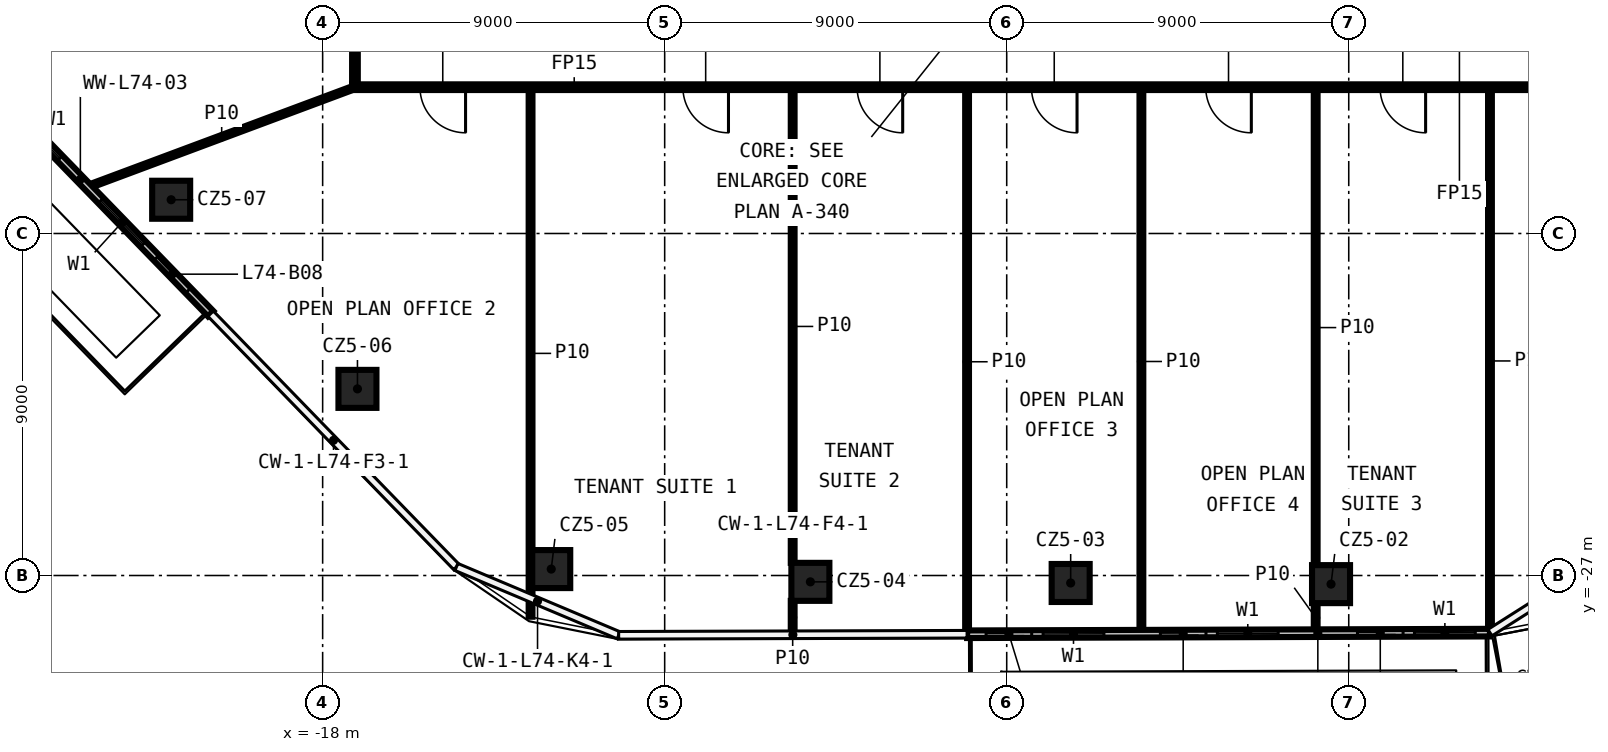
"""IFC4 building model, lengths in metres.
Left out: names, types, materials, properties, quantities, classifications, styles, units other than length and angle.
Written with IfcOpenShell. Run it as: python <this file> out.ifc"""

import sys

from ifc_helpers import new_model, si_unit, direction, frame, frame_2d, origin, origin_2d, place, context, subcontext, project, spatial, rectangle, extrude, element, fill, save


model = new_model("IFC4")
c1 = context("Model", 3, precision=1e-05, world=origin(), true_north=direction((0.0, 1.0)))
c2 = subcontext(c1, "Body", "Model", "MODEL_VIEW")
j1 = project(units=[si_unit("LENGTHUNIT", "METRE"), si_unit("PLANEANGLEUNIT", "RADIAN")], contexts=[c1])
p1 = place(None, origin())
s1 = spatial("IfcSite", under=j1, at=p1, CompositionType="ELEMENT")
p2 = place(p1, origin())
s2 = spatial("IfcBuilding", under=s1, at=p2, CompositionType="ELEMENT")
p3 = place(p2, frame((0.0, 0.0, 344.6)))
s3 = spatial("IfcBuildingStorey", under=s2, at=p3, CompositionType="ELEMENT", Elevation=344.6)
for number, where, z_axis, x_axis in (
    (1, (8.534, -27.227, 0.0), (0.0, 0.0, 1.0), (1.0, 0.0, 0.0)),
    (2, (1.683, -27.197, 0.0), (0.0, 0.0, 1.0), (1.0, 0.0, 0.0)),
    (3, (-5.166, -27.167, 0.0), (0.0, 0.0, 1.0), (1.0, 0.0, 0.0)),
    (4, (-11.985, -26.831, 0.0), (0.0, 0.0, 1.0), (1.0, 0.0, 0.0)),
    (5, (-17.084, -22.089, 0.0), (0.0, 0.0, 1.0), (1.0, 0.0, 0.0)),
    (6, (-21.986, -17.112, 0.0), (0.0, 0.0, 1.0), (1.0, 0.0, 0.0)),
):
    element("IfcColumn", number, at=place(p3, frame(where, z_axis=z_axis, x_axis=x_axis)), inside=s3, PredefinedType="COLUMN", context=c2, shape_type="SweptSolid", body=[
        extrude(rectangle(XDim=1.0, YDim=1.0, at=origin_2d()), origin(), (0.0, 0.0, 1.0), 3.82),
    ])
p4 = place(p3, frame((17.225, -14.15, 0.0), z_axis=(0.0, 0.0, 1.0), x_axis=(-1.0, 0.0, 0.0)))
e7 = element("IfcWall", 7, at=p4, inside=s3, PredefinedType="PARTITIONING", context=c2, shape_type="SweptSolid", body=[
    extrude(rectangle(XDim=34.45, YDim=0.15, at=frame_2d((17.225, 0.0))), origin(), (0.0, 0.0, 1.0), 3.82),
])
p5 = place(p4, frame((31.464, 0.0, 0.0)))
e8 = element("IfcOpeningElement", 8, at=p5, cuts=e7, PredefinedType="OPENING", context=c2, shape_type="SweptSolid", body=[
    extrude(rectangle(XDim=1.2, YDim=2.1, at=frame_2d((0.6, 1.05))), frame((0.0, 0.085, 0.0), z_axis=(0.0, -1.0, 0.0), x_axis=(1.0, 0.0, 0.0)), (0.0, 0.0, 1.0), 0.17),
])
p6 = place(p4, frame((24.546, 0.0, 0.0)))
e9 = element("IfcOpeningElement", 9, at=p6, cuts=e7, PredefinedType="OPENING", context=c2, shape_type="SweptSolid", body=[
    extrude(rectangle(XDim=1.2, YDim=2.1, at=frame_2d((0.6, 1.05))), frame((0.0, 0.085, 0.0), z_axis=(0.0, -1.0, 0.0), x_axis=(1.0, 0.0, 0.0)), (0.0, 0.0, 1.0), 0.17),
])
p7 = place(p4, frame((19.962, 0.0, 0.0)))
e10 = element("IfcOpeningElement", 10, at=p7, cuts=e7, PredefinedType="OPENING", context=c2, shape_type="SweptSolid", body=[
    extrude(rectangle(XDim=1.2, YDim=2.1, at=frame_2d((0.6, 1.05))), frame((0.0, 0.085, 0.0), z_axis=(0.0, -1.0, 0.0), x_axis=(1.0, 0.0, 0.0)), (0.0, 0.0, 1.0), 0.17),
])
p8 = place(p4, frame((15.375, 0.0, 0.0)))
e11 = element("IfcOpeningElement", 11, at=p8, cuts=e7, PredefinedType="OPENING", context=c2, shape_type="SweptSolid", body=[
    extrude(rectangle(XDim=1.2, YDim=2.1, at=frame_2d((0.6, 1.05))), frame((0.0, 0.085, 0.0), z_axis=(0.0, -1.0, 0.0), x_axis=(1.0, 0.0, 0.0)), (0.0, 0.0, 1.0), 0.17),
])
p9 = place(p4, frame((10.788, 0.0, 0.0)))
e12 = element("IfcOpeningElement", 12, at=p9, cuts=e7, PredefinedType="OPENING", context=c2, shape_type="SweptSolid", body=[
    extrude(rectangle(XDim=1.2, YDim=2.1, at=frame_2d((0.6, 1.05))), frame((0.0, 0.085, 0.0), z_axis=(0.0, -1.0, 0.0), x_axis=(1.0, 0.0, 0.0)), (0.0, 0.0, 1.0), 0.17),
])
p10 = place(p4, frame((6.202, 0.0, 0.0)))
e13 = element("IfcOpeningElement", 13, at=p10, cuts=e7, PredefinedType="OPENING", context=c2, shape_type="SweptSolid", body=[
    extrude(rectangle(XDim=1.2, YDim=2.1, at=frame_2d((0.6, 1.05))), frame((0.0, 0.085, 0.0), z_axis=(0.0, -1.0, 0.0), x_axis=(1.0, 0.0, 0.0)), (0.0, 0.0, 1.0), 0.17),
])
p11 = place(p4, frame((1.897, 0.0, 0.0)))
e14 = element("IfcOpeningElement", 14, at=p11, cuts=e7, PredefinedType="OPENING", context=c2, shape_type="SweptSolid", body=[
    extrude(rectangle(XDim=1.2, YDim=2.1, at=frame_2d((0.6, 1.05))), frame((0.0, 0.085, 0.0), z_axis=(0.0, -1.0, 0.0), x_axis=(1.0, 0.0, 0.0)), (0.0, 0.0, 1.0), 0.17),
])
p12 = place(p3, frame((-24.164, -16.767, 0.0), z_axis=(0.0, 0.0, 1.0), x_axis=(0.936910882714, 0.349568302127, 0.0)))
e15 = element("IfcWall", 15, at=p12, inside=s3, PredefinedType="PARTITIONING", context=c2, shape_type="SweptSolid", body=[
    extrude(rectangle(XDim=7.486, YDim=0.1, at=frame_2d((3.743, 0.0))), origin(), (0.0, 0.0, 1.0), 3.82),
])
p13 = place(p3, frame((12.716, -28.483, 0.0), z_axis=(0.0, 0.0, 1.0), x_axis=(0.0, 1.0, 0.0)))
e16 = element("IfcWall", 16, at=p13, inside=s3, PredefinedType="PARTITIONING", context=c2, shape_type="SweptSolid", body=[
    extrude(rectangle(XDim=14.258, YDim=0.1, at=frame_2d((7.129, 0.0))), origin(), (0.0, 0.0, 1.0), 3.82),
])
p14 = place(p3, frame((8.13, -28.498, 0.0), z_axis=(0.0, 0.0, 1.0), x_axis=(0.0, 1.0, 0.0)))
e17 = element("IfcWall", 17, at=p14, inside=s3, PredefinedType="PARTITIONING", context=c2, shape_type="SweptSolid", body=[
    extrude(rectangle(XDim=0.771, YDim=0.1, at=frame_2d((0.385, 0.0))), origin(), (0.0, 0.0, 1.0), 3.82),
])
p15 = place(p3, frame((8.13, -26.727, 0.0), z_axis=(0.0, 0.0, 1.0), x_axis=(0.0, 1.0, 0.0)))
e18 = element("IfcWall", 18, at=p15, inside=s3, PredefinedType="PARTITIONING", context=c2, shape_type="SweptSolid", body=[
    extrude(rectangle(XDim=12.502, YDim=0.1, at=frame_2d((6.251, 0.0))), origin(), (0.0, 0.0, 1.0), 3.82),
])
p16 = place(p3, frame((3.544, -28.512, 0.0), z_axis=(0.0, 0.0, 1.0), x_axis=(0.0, 1.0, 0.0)))
e19 = element("IfcWall", 19, at=p16, inside=s3, PredefinedType="PARTITIONING", context=c2, shape_type="SweptSolid", body=[
    extrude(rectangle(XDim=14.287, YDim=0.1, at=frame_2d((7.143, 0.0))), origin(), (0.0, 0.0, 1.0), 3.82),
])
p17 = place(p3, frame((-1.043, -28.526, 0.0), z_axis=(0.0, 0.0, 1.0), x_axis=(0.0, 1.0, 0.0)))
e20 = element("IfcWall", 20, at=p17, inside=s3, PredefinedType="PARTITIONING", context=c2, shape_type="SweptSolid", body=[
    extrude(rectangle(XDim=14.301, YDim=0.1, at=frame_2d((7.15, 0.0))), origin(), (0.0, 0.0, 1.0), 3.82),
])
p18 = place(p3, frame((-5.632, -28.54, 0.0), z_axis=(0.0, 0.0, 1.0), x_axis=(0.0, 1.0, 0.0)))
e21 = element("IfcWall", 21, at=p18, inside=s3, PredefinedType="PARTITIONING", context=c2, shape_type="SweptSolid", body=[
    extrude(rectangle(XDim=0.873, YDim=0.1, at=frame_2d((0.437, 0.0))), origin(), (0.0, 0.0, 1.0), 3.82),
])
p19 = place(p3, frame((-5.632, -26.667, 0.0), z_axis=(0.0, 0.0, 1.0), x_axis=(0.0, 1.0, 0.0)))
e22 = element("IfcWall", 22, at=p19, inside=s3, PredefinedType="PARTITIONING", context=c2, shape_type="SweptSolid", body=[
    extrude(rectangle(XDim=12.442, YDim=0.1, at=frame_2d((6.221, 0.0))), origin(), (0.0, 0.0, 1.0), 3.82),
])
p20 = place(p3, frame((-12.529, -28.085, 0.0), z_axis=(0.0, 0.0, 1.0), x_axis=(0.0, 1.0, 0.0)))
e23 = element("IfcWall", 23, at=p20, inside=s3, PredefinedType="PARTITIONING", context=c2, shape_type="SweptSolid", body=[
    extrude(rectangle(XDim=13.86, YDim=0.1, at=frame_2d((6.93, 0.0))), origin(), (0.0, 0.0, 1.0), 3.82),
])
p21 = place(p3, frame((-17.15, -14.075, 0.0), z_axis=(0.0, 0.0, 1.0), x_axis=(0.0, 1.0, 0.0)))
e24 = element("IfcWall", 24, at=p21, inside=s3, PredefinedType="PARTITIONING", context=c2, shape_type="SweptSolid", body=[
    extrude(rectangle(XDim=28.15, YDim=0.15, at=frame_2d((14.075, 0.0))), origin(), (0.0, 0.0, 1.0), 3.82),
])
p22 = place(p21, frame((3.891, 0.0, 0.0)))
e25 = element("IfcOpeningElement", 25, at=p22, cuts=e24, PredefinedType="OPENING", context=c2, shape_type="SweptSolid", body=[
    extrude(rectangle(XDim=1.2, YDim=2.1, at=frame_2d((0.6, 1.05))), frame((0.0, 0.085, 0.0), z_axis=(0.0, -1.0, 0.0), x_axis=(1.0, 0.0, 0.0)), (0.0, 0.0, 1.0), 0.17),
])
p23 = place(p21, frame((24.312, 0.0, 0.0)))
e26 = element("IfcOpeningElement", 26, at=p23, cuts=e24, PredefinedType="OPENING", context=c2, shape_type="SweptSolid", body=[
    extrude(rectangle(XDim=1.2, YDim=2.1, at=frame_2d((0.6, 1.05))), frame((0.0, 0.085, 0.0), z_axis=(0.0, -1.0, 0.0), x_axis=(1.0, 0.0, 0.0)), (0.0, 0.0, 1.0), 0.17),
])
p24 = place(p3, frame((-27.422, -13.438, 0.0), z_axis=(0.0, 0.0, 1.0), x_axis=(0.696377931732, -0.717675258175, 0.0)))
e27 = element("IfcWall", 27, at=p24, inside=s3, PredefinedType="SOLIDWALL", context=c2, shape_type="SweptSolid", body=[
    extrude(rectangle(XDim=9.297, YDim=0.2, at=frame_2d((4.648, 0.0))), origin(), (0.0, 0.0, 1.0), 3.7),
])
p25 = place(p24, frame((2.0, 0.0, 0.6)))
e28 = element("IfcOpeningElement", 28, at=p25, cuts=e27, PredefinedType="OPENING", context=c2, shape_type="SweptSolid", body=[
    extrude(rectangle(XDim=1.6, YDim=2.4, at=frame_2d((0.8, 1.2))), frame((0.0, 0.11, 0.0), z_axis=(0.0, -1.0, 0.0), x_axis=(1.0, 0.0, 0.0)), (0.0, 0.0, 1.0), 0.22),
])
p26 = place(p24, frame((0.5, 0.0, 0.0)))
e29 = element("IfcOpeningElement", 29, at=p26, cuts=e27, PredefinedType="OPENING", context=c2, shape_type="SweptSolid", body=[
    extrude(rectangle(XDim=1.2, YDim=2.4, at=frame_2d((0.6, 1.2))), frame((0.0, 0.11, 0.0), z_axis=(0.0, -1.0, 0.0), x_axis=(1.0, 0.0, 0.0)), (0.0, 0.0, 1.0), 0.22),
])
p27 = place(p24, frame((5.148, 0.0, 0.6)))
e30 = element("IfcOpeningElement", 30, at=p27, cuts=e27, PredefinedType="OPENING", context=c2, shape_type="SweptSolid", body=[
    extrude(rectangle(XDim=1.6, YDim=2.4, at=frame_2d((0.8, 1.2))), frame((0.0, 0.11, 0.0), z_axis=(0.0, -1.0, 0.0), x_axis=(1.0, 0.0, 0.0)), (0.0, 0.0, 1.0), 0.22),
])
p28 = place(p24, frame((7.249, 0.0, 0.0)))
e31 = element("IfcOpeningElement", 31, at=p28, cuts=e27, PredefinedType="OPENING", context=c2, shape_type="SweptSolid", body=[
    extrude(rectangle(XDim=1.2, YDim=2.4, at=frame_2d((0.6, 1.2))), frame((0.0, 0.11, 0.0), z_axis=(0.0, -1.0, 0.0), x_axis=(1.0, 0.0, 0.0)), (0.0, 0.0, 1.0), 0.22),
])
p29 = place(p3, frame((-1.042, -28.546, 0.0), z_axis=(0.0, 0.0, 1.0), x_axis=(0.999995287953, 0.003069865224, 0.0)))
e32 = element("IfcWall", 32, at=p29, inside=s3, PredefinedType="SOLIDWALL", context=c2, shape_type="SweptSolid", body=[
    extrude(rectangle(XDim=13.758, YDim=0.2, at=frame_2d((6.879, 0.0))), origin(), (0.0, 0.0, 1.0), 3.7),
])
p30 = place(p29, frame((2.0, 0.0, 0.6)))
e33 = element("IfcOpeningElement", 33, at=p30, cuts=e32, PredefinedType="OPENING", context=c2, shape_type="SweptSolid", body=[
    extrude(rectangle(XDim=1.6, YDim=2.4, at=frame_2d((0.8, 1.2))), frame((0.0, 0.11, 0.0), z_axis=(0.0, -1.0, 0.0), x_axis=(1.0, 0.0, 0.0)), (0.0, 0.0, 1.0), 0.22),
])
p31 = place(p29, frame((0.5, 0.0, 0.0)))
e34 = element("IfcOpeningElement", 34, at=p31, cuts=e32, PredefinedType="OPENING", context=c2, shape_type="SweptSolid", body=[
    extrude(rectangle(XDim=1.2, YDim=2.4, at=frame_2d((0.6, 1.2))), frame((0.0, 0.11, 0.0), z_axis=(0.0, -1.0, 0.0), x_axis=(1.0, 0.0, 0.0)), (0.0, 0.0, 1.0), 0.22),
])
p32 = place(p29, frame((6.586, 0.0, 0.6)))
e35 = element("IfcOpeningElement", 35, at=p32, cuts=e32, PredefinedType="OPENING", context=c2, shape_type="SweptSolid", body=[
    extrude(rectangle(XDim=1.6, YDim=2.4, at=frame_2d((0.8, 1.2))), frame((0.0, 0.11, 0.0), z_axis=(0.0, -1.0, 0.0), x_axis=(1.0, 0.0, 0.0)), (0.0, 0.0, 1.0), 0.22),
])
p33 = place(p29, frame((5.086, 0.0, 0.0)))
e36 = element("IfcOpeningElement", 36, at=p33, cuts=e32, PredefinedType="OPENING", context=c2, shape_type="SweptSolid", body=[
    extrude(rectangle(XDim=1.2, YDim=2.4, at=frame_2d((0.6, 1.2))), frame((0.0, 0.11, 0.0), z_axis=(0.0, -1.0, 0.0), x_axis=(1.0, 0.0, 0.0)), (0.0, 0.0, 1.0), 0.22),
])
p34 = place(p29, frame((11.772, 0.0, 0.6)))
e37 = element("IfcOpeningElement", 37, at=p34, cuts=e32, PredefinedType="OPENING", context=c2, shape_type="SweptSolid", body=[
    extrude(rectangle(XDim=1.6, YDim=2.4, at=frame_2d((0.8, 1.2))), frame((0.0, 0.11, 0.0), z_axis=(0.0, -1.0, 0.0), x_axis=(1.0, 0.0, 0.0)), (0.0, 0.0, 1.0), 0.22),
])
p35 = place(p29, frame((10.272, 0.0, 0.0)))
e38 = element("IfcOpeningElement", 38, at=p35, cuts=e32, PredefinedType="OPENING", context=c2, shape_type="SweptSolid", body=[
    extrude(rectangle(XDim=1.2, YDim=2.4, at=frame_2d((0.6, 1.2))), frame((0.0, 0.11, 0.0), z_axis=(0.0, -1.0, 0.0), x_axis=(1.0, 0.0, 0.0)), (0.0, 0.0, 1.0), 0.22),
])
p36 = place(p5, origin())
e39 = element("IfcDoor", 39, at=p36, inside=s3, OperationType="SINGLE_SWING_LEFT", PredefinedType="DOOR", context=c2, shape_type="SweptSolid", body=[
    extrude(rectangle(XDim=1.2, YDim=2.1, at=frame_2d((0.6, 1.05))), frame((0.0, 0.025, 0.0), z_axis=(0.0, -1.0, 0.0), x_axis=(1.0, 0.0, 0.0)), (0.0, 0.0, 1.0), 0.05),
])
fill(e8, e39)
p37 = place(p6, origin())
e40 = element("IfcDoor", 40, at=p37, inside=s3, OperationType="SINGLE_SWING_RIGHT", PredefinedType="DOOR", context=c2, shape_type="SweptSolid", body=[
    extrude(rectangle(XDim=1.2, YDim=2.1, at=frame_2d((0.6, 1.05))), frame((0.0, 0.025, 0.0), z_axis=(0.0, -1.0, 0.0), x_axis=(1.0, 0.0, 0.0)), (0.0, 0.0, 1.0), 0.05),
])
fill(e9, e40)
p38 = place(p7, origin())
e41 = element("IfcDoor", 41, at=p38, inside=s3, OperationType="SINGLE_SWING_LEFT", PredefinedType="DOOR", context=c2, shape_type="SweptSolid", body=[
    extrude(rectangle(XDim=1.2, YDim=2.1, at=frame_2d((0.6, 1.05))), frame((0.0, 0.025, 0.0), z_axis=(0.0, -1.0, 0.0), x_axis=(1.0, 0.0, 0.0)), (0.0, 0.0, 1.0), 0.05),
])
fill(e10, e41)
p39 = place(p8, origin())
e42 = element("IfcDoor", 42, at=p39, inside=s3, OperationType="SINGLE_SWING_RIGHT", PredefinedType="DOOR", context=c2, shape_type="SweptSolid", body=[
    extrude(rectangle(XDim=1.2, YDim=2.1, at=frame_2d((0.6, 1.05))), frame((0.0, 0.025, 0.0), z_axis=(0.0, -1.0, 0.0), x_axis=(1.0, 0.0, 0.0)), (0.0, 0.0, 1.0), 0.05),
])
fill(e11, e42)
p40 = place(p9, origin())
e43 = element("IfcDoor", 43, at=p40, inside=s3, OperationType="SINGLE_SWING_LEFT", PredefinedType="DOOR", context=c2, shape_type="SweptSolid", body=[
    extrude(rectangle(XDim=1.2, YDim=2.1, at=frame_2d((0.6, 1.05))), frame((0.0, 0.025, 0.0), z_axis=(0.0, -1.0, 0.0), x_axis=(1.0, 0.0, 0.0)), (0.0, 0.0, 1.0), 0.05),
])
fill(e12, e43)
p41 = place(p10, origin())
e44 = element("IfcDoor", 44, at=p41, inside=s3, OperationType="SINGLE_SWING_RIGHT", PredefinedType="DOOR", context=c2, shape_type="SweptSolid", body=[
    extrude(rectangle(XDim=1.2, YDim=2.1, at=frame_2d((0.6, 1.05))), frame((0.0, 0.025, 0.0), z_axis=(0.0, -1.0, 0.0), x_axis=(1.0, 0.0, 0.0)), (0.0, 0.0, 1.0), 0.05),
])
fill(e13, e44)
p42 = place(p25, origin())
e45 = element("IfcWindow", 45, at=p42, inside=s3, PartitioningType="SINGLE_PANEL", PredefinedType="WINDOW", context=c2, shape_type="SweptSolid", body=[
    extrude(rectangle(XDim=1.6, YDim=2.4, at=frame_2d((0.8, 1.2))), frame((0.0, 0.03, 0.0), z_axis=(0.0, -1.0, 0.0), x_axis=(1.0, 0.0, 0.0)), (0.0, 0.0, 1.0), 0.06),
])
fill(e28, e45)
p43 = place(p27, origin())
e46 = element("IfcWindow", 46, at=p43, inside=s3, PartitioningType="SINGLE_PANEL", PredefinedType="WINDOW", context=c2, shape_type="SweptSolid", body=[
    extrude(rectangle(XDim=1.6, YDim=2.4, at=frame_2d((0.8, 1.2))), frame((0.0, 0.03, 0.0), z_axis=(0.0, -1.0, 0.0), x_axis=(1.0, 0.0, 0.0)), (0.0, 0.0, 1.0), 0.06),
])
fill(e30, e46)
p44 = place(p28, origin())
e47 = element("IfcDoor", 47, at=p44, inside=s3, OperationType="SLIDING_TO_LEFT", PredefinedType="DOOR", context=c2, shape_type="SweptSolid", body=[
    extrude(rectangle(XDim=1.2, YDim=2.4, at=frame_2d((0.6, 1.2))), frame((0.0, 0.025, 0.0), z_axis=(0.0, -1.0, 0.0), x_axis=(1.0, 0.0, 0.0)), (0.0, 0.0, 1.0), 0.05),
])
fill(e31, e47)
p45 = place(p30, origin())
e48 = element("IfcWindow", 48, at=p45, inside=s3, PartitioningType="SINGLE_PANEL", PredefinedType="WINDOW", context=c2, shape_type="SweptSolid", body=[
    extrude(rectangle(XDim=1.6, YDim=2.4, at=frame_2d((0.8, 1.2))), frame((0.0, 0.03, 0.0), z_axis=(0.0, -1.0, 0.0), x_axis=(1.0, 0.0, 0.0)), (0.0, 0.0, 1.0), 0.06),
])
fill(e33, e48)
p46 = place(p31, origin())
e49 = element("IfcDoor", 49, at=p46, inside=s3, OperationType="SLIDING_TO_LEFT", PredefinedType="DOOR", context=c2, shape_type="SweptSolid", body=[
    extrude(rectangle(XDim=1.2, YDim=2.4, at=frame_2d((0.6, 1.2))), frame((0.0, 0.025, 0.0), z_axis=(0.0, -1.0, 0.0), x_axis=(1.0, 0.0, 0.0)), (0.0, 0.0, 1.0), 0.05),
])
fill(e34, e49)
p47 = place(p32, origin())
e50 = element("IfcWindow", 50, at=p47, inside=s3, PartitioningType="SINGLE_PANEL", PredefinedType="WINDOW", context=c2, shape_type="SweptSolid", body=[
    extrude(rectangle(XDim=1.6, YDim=2.4, at=frame_2d((0.8, 1.2))), frame((0.0, 0.03, 0.0), z_axis=(0.0, -1.0, 0.0), x_axis=(1.0, 0.0, 0.0)), (0.0, 0.0, 1.0), 0.06),
])
fill(e35, e50)
p48 = place(p33, origin())
e51 = element("IfcDoor", 51, at=p48, inside=s3, OperationType="SLIDING_TO_LEFT", PredefinedType="DOOR", context=c2, shape_type="SweptSolid", body=[
    extrude(rectangle(XDim=1.2, YDim=2.4, at=frame_2d((0.6, 1.2))), frame((0.0, 0.025, 0.0), z_axis=(0.0, -1.0, 0.0), x_axis=(1.0, 0.0, 0.0)), (0.0, 0.0, 1.0), 0.05),
])
fill(e36, e51)
p49 = place(p34, origin())
e52 = element("IfcWindow", 52, at=p49, inside=s3, PartitioningType="SINGLE_PANEL", PredefinedType="WINDOW", context=c2, shape_type="SweptSolid", body=[
    extrude(rectangle(XDim=1.6, YDim=2.4, at=frame_2d((0.8, 1.2))), frame((0.0, 0.03, 0.0), z_axis=(0.0, -1.0, 0.0), x_axis=(1.0, 0.0, 0.0)), (0.0, 0.0, 1.0), 0.06),
])
fill(e37, e52)
p50 = place(p35, origin())
e53 = element("IfcDoor", 53, at=p50, inside=s3, OperationType="SLIDING_TO_LEFT", PredefinedType="DOOR", context=c2, shape_type="SweptSolid", body=[
    extrude(rectangle(XDim=1.2, YDim=2.4, at=frame_2d((0.6, 1.2))), frame((0.0, 0.025, 0.0), z_axis=(0.0, -1.0, 0.0), x_axis=(1.0, 0.0, 0.0)), (0.0, 0.0, 1.0), 0.05),
])
fill(e38, e53)
save(model, sys.argv[1])
